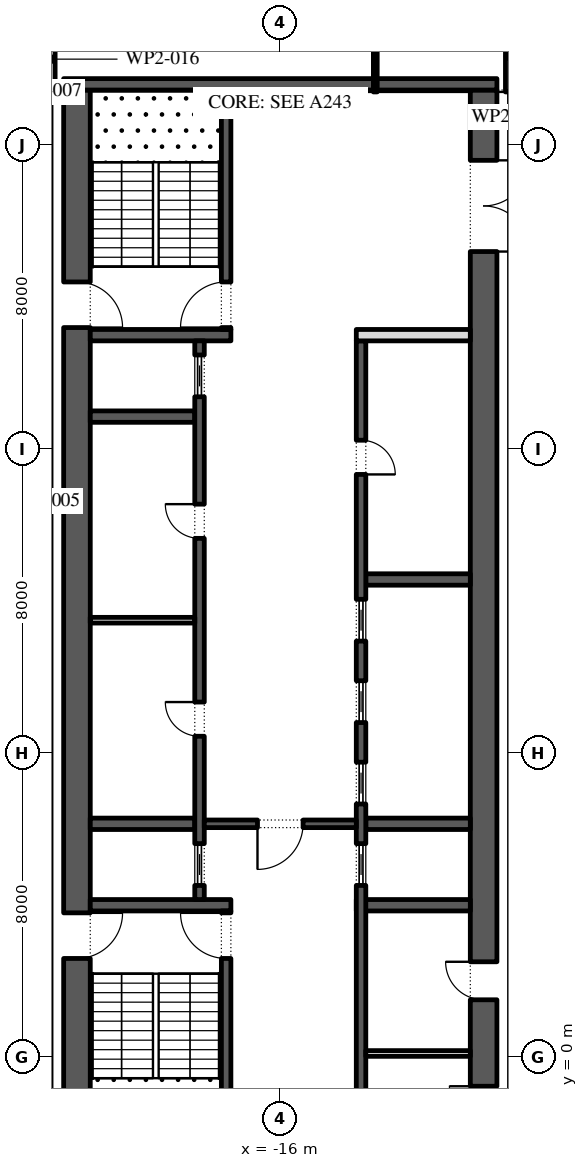
"""IFC4 building model, lengths in metres.
Left out: names, types, materials, properties, quantities, classifications, styles, units other than length and angle.
Written with IfcOpenShell. Run it as: python <this file> out.ifc"""

import sys

from ifc_helpers import new_model, si_unit, direction, frame, frame_2d, origin, place, context, subcontext, project, spatial, rectangle, extrude, element, fill, save


model = new_model("IFC4")
c1 = context("Model", 3, precision=1e-05, world=origin(), true_north=direction((0.0, 1.0)))
c2 = subcontext(c1, "Body", "Model", "MODEL_VIEW")
j1 = project(units=[si_unit("LENGTHUNIT", "METRE"), si_unit("PLANEANGLEUNIT", "RADIAN")], contexts=[c1])
p1 = place(None, origin())
s1 = spatial("IfcSite", under=j1, at=p1, CompositionType="ELEMENT")
p2 = place(p1, origin())
s2 = spatial("IfcBuilding", under=s1, at=p2, CompositionType="ELEMENT")
p3 = place(p2, frame((0.0, 0.0, 184.2)))
s3 = spatial("IfcBuildingStorey", under=s2, at=p3, CompositionType="ELEMENT", Elevation=184.2)
p4 = place(p3, frame((-33.157, 30.092, 0.0), z_axis=(0.0, 0.0, 1.0), x_axis=(0.224950279389, -0.974370243697, 0.0)))
e1 = element("IfcWall", 1, at=p4, inside=s3, PredefinedType="STANDARD", context=c2, shape_type="SweptSolid", body=[
    extrude(rectangle(XDim=49.5, YDim=0.3, at=frame_2d((24.75, 0.0))), origin(), (0.0, 0.0, 1.0), 4.0),
])
p5 = place(p4, frame((2.207, 0.0, 0.0)))
e2 = element("IfcOpeningElement", 2, at=p5, cuts=e1, PredefinedType="OPENING", context=c2, shape_type="SweptSolid", body=[
    extrude(rectangle(XDim=2.4, YDim=3.5, at=frame_2d((1.2, 1.75))), frame((0.0, 0.16, 0.0), z_axis=(0.0, -1.0, 0.0), x_axis=(1.0, 0.0, 0.0)), (0.0, 0.0, 1.0), 0.32),
])
p6 = place(p4, frame((8.121, 0.0, 0.45)))
e3 = element("IfcOpeningElement", 3, at=p6, cuts=e1, PredefinedType="OPENING", context=c2, shape_type="SweptSolid", body=[
    extrude(rectangle(XDim=4.5, YDim=2.825, at=frame_2d((2.25, 1.413))), frame((0.0, 0.16, 0.0), z_axis=(0.0, -1.0, 0.0), x_axis=(1.0, 0.0, 0.0)), (0.0, 0.0, 1.0), 0.32),
])
p7 = place(p4, frame((15.236, 0.0, 0.45)))
e4 = element("IfcOpeningElement", 4, at=p7, cuts=e1, PredefinedType="OPENING", context=c2, shape_type="SweptSolid", body=[
    extrude(rectangle(XDim=4.5, YDim=2.95, at=frame_2d((2.25, 1.475))), frame((0.0, 0.16, 0.0), z_axis=(0.0, -1.0, 0.0), x_axis=(1.0, 0.0, 0.0)), (0.0, 0.0, 1.0), 0.32),
])
p8 = place(p4, frame((22.35, 0.0, 0.45)))
e5 = element("IfcOpeningElement", 5, at=p8, cuts=e1, PredefinedType="OPENING", context=c2, shape_type="SweptSolid", body=[
    extrude(rectangle(XDim=4.5, YDim=3.0, at=frame_2d((2.25, 1.5))), frame((0.0, 0.16, 0.0), z_axis=(0.0, -1.0, 0.0), x_axis=(1.0, 0.0, 0.0)), (0.0, 0.0, 1.0), 0.32),
])
p9 = place(p4, frame((30.514, 0.0, 0.0)))
e6 = element("IfcOpeningElement", 6, at=p9, cuts=e1, PredefinedType="OPENING", context=c2, shape_type="SweptSolid", body=[
    extrude(rectangle(XDim=2.4, YDim=3.5, at=frame_2d((1.2, 1.75))), frame((0.0, 0.16, 0.0), z_axis=(0.0, -1.0, 0.0), x_axis=(1.0, 0.0, 0.0)), (0.0, 0.0, 1.0), 0.32),
])
p10 = place(p4, frame((36.579, 0.0, 0.45)))
e7 = element("IfcOpeningElement", 7, at=p10, cuts=e1, PredefinedType="OPENING", context=c2, shape_type="SweptSolid", body=[
    extrude(rectangle(XDim=4.5, YDim=3.05, at=frame_2d((2.25, 1.525))), frame((0.0, 0.16, 0.0), z_axis=(0.0, -1.0, 0.0), x_axis=(1.0, 0.0, 0.0)), (0.0, 0.0, 1.0), 0.32),
])
p11 = place(p4, frame((43.693, 0.0, 0.45)))
e8 = element("IfcOpeningElement", 8, at=p11, cuts=e1, PredefinedType="OPENING", context=c2, shape_type="SweptSolid", body=[
    extrude(rectangle(XDim=4.5, YDim=3.05, at=frame_2d((2.25, 1.525))), frame((0.0, 0.16, 0.0), z_axis=(0.0, -1.0, 0.0), x_axis=(1.0, 0.0, 0.0)), (0.0, 0.0, 1.0), 0.32),
])
p12 = place(p3, frame((-21.35, -2.45, 0.0), z_axis=(0.0, 0.0, 1.0), x_axis=(0.0, 1.0, 0.0)))
e9 = element("IfcWall", 9, at=p12, inside=s3, PredefinedType="SHEAR", context=c2, shape_type="SweptSolid", body=[
    extrude(rectangle(XDim=27.9, YDim=0.7, at=frame_2d((13.95, 0.0))), origin(), (0.0, 0.0, 1.0), 4.0),
])
p13 = place(p12, frame((5.05, 0.0, 0.0)))
e10 = element("IfcOpeningElement", 10, at=p13, cuts=e9, PredefinedType="OPENING", context=c2, shape_type="SweptSolid", body=[
    extrude(rectangle(XDim=1.2, YDim=2.1, at=frame_2d((0.6, 1.05))), frame((0.0, 0.36, 0.0), z_axis=(0.0, -1.0, 0.0), x_axis=(1.0, 0.0, 0.0)), (0.0, 0.0, 1.0), 0.72),
])
p14 = place(p12, frame((21.65, 0.0, 0.0)))
e11 = element("IfcOpeningElement", 11, at=p14, cuts=e9, PredefinedType="OPENING", context=c2, shape_type="SweptSolid", body=[
    extrude(rectangle(XDim=1.2, YDim=2.1, at=frame_2d((0.6, 1.05))), frame((0.0, 0.36, 0.0), z_axis=(0.0, -1.0, 0.0), x_axis=(1.0, 0.0, 0.0)), (0.0, 0.0, 1.0), 0.72),
])
p15 = place(p3, frame((-10.65, -2.45, 0.0), z_axis=(0.0, 0.0, 1.0), x_axis=(0.0, 1.0, 0.0)))
e12 = element("IfcWall", 12, at=p15, inside=s3, PredefinedType="SHEAR", context=c2, shape_type="SweptSolid", body=[
    extrude(rectangle(XDim=27.9, YDim=0.7, at=frame_2d((13.95, 0.0))), origin(), (0.0, 0.0, 1.0), 4.0),
])
p16 = place(p15, frame((23.65, 0.0, 0.0)))
e13 = element("IfcOpeningElement", 13, at=p16, cuts=e12, PredefinedType="OPENING", context=c2, shape_type="SweptSolid", body=[
    extrude(rectangle(XDim=2.4, YDim=2.1, at=frame_2d((1.2, 1.05))), frame((0.0, 0.36, 0.0), z_axis=(0.0, -1.0, 0.0), x_axis=(1.0, 0.0, 0.0)), (0.0, 0.0, 1.0), 0.72),
])
p17 = place(p15, frame((0.788, 0.0, 0.0)))
e14 = element("IfcOpeningElement", 14, at=p17, cuts=e12, PredefinedType="OPENING", context=c2, shape_type="SweptSolid", body=[
    extrude(rectangle(XDim=0.9, YDim=2.1, at=frame_2d((0.45, 1.05))), frame((0.0, 0.36, 0.0), z_axis=(0.0, -1.0, 0.0), x_axis=(1.0, 0.0, 0.0)), (0.0, 0.0, 1.0), 0.72),
])
p18 = place(p15, frame((3.962, 0.0, 0.0)))
e15 = element("IfcOpeningElement", 15, at=p18, cuts=e12, PredefinedType="OPENING", context=c2, shape_type="SweptSolid", body=[
    extrude(rectangle(XDim=1.0, YDim=2.1, at=frame_2d((0.5, 1.05))), frame((0.0, 0.36, 0.0), z_axis=(0.0, -1.0, 0.0), x_axis=(1.0, 0.0, 0.0)), (0.0, 0.0, 1.0), 0.72),
])
p19 = place(p3, frame((-21.7, 25.6, 0.0), z_axis=(0.0, 0.0, 1.0), x_axis=(1.0, 0.0, 0.0)))
e16 = element("IfcWall", 16, at=p19, inside=s3, PredefinedType="SHEAR", context=c2, shape_type="SweptSolid", body=[
    extrude(rectangle(XDim=11.4, YDim=0.3, at=frame_2d((5.7, 0.0))), origin(), (0.0, 0.0, 1.0), 4.0),
])
p20 = place(p3, frame((-21.0, 4.0, 0.0), z_axis=(0.0, 0.0, 1.0), x_axis=(1.0, 0.0, 0.0)))
e17 = element("IfcWall", 17, at=p20, inside=s3, PredefinedType="SHEAR", context=c2, shape_type="SweptSolid", body=[
    extrude(rectangle(XDim=3.7, YDim=0.3, at=frame_2d((1.85, 0.0))), origin(), (0.0, 0.0, 1.0), 4.0),
])
p21 = place(p3, frame((-17.425, -2.45, 0.0), z_axis=(0.0, 0.0, 1.0), x_axis=(0.0, 1.0, 0.0)))
e18 = element("IfcWall", 18, at=p21, inside=s3, PredefinedType="SHEAR", context=c2, shape_type="SweptSolid", body=[
    extrude(rectangle(XDim=6.3, YDim=0.25, at=frame_2d((3.15, 0.0))), origin(), (0.0, 0.0, 1.0), 4.0),
])
p22 = place(p21, frame((5.05, 0.0, 0.0)))
e19 = element("IfcOpeningElement", 19, at=p22, cuts=e18, PredefinedType="OPENING", context=c2, shape_type="SweptSolid", body=[
    extrude(rectangle(XDim=1.2, YDim=2.1, at=frame_2d((0.6, 1.05))), frame((0.0, 0.135, 0.0), z_axis=(0.0, -1.0, 0.0), x_axis=(1.0, 0.0, 0.0)), (0.0, 0.0, 1.0), 0.27),
])
p23 = place(p3, frame((-21.0, 19.0, 0.0), z_axis=(0.0, 0.0, 1.0), x_axis=(1.0, 0.0, 0.0)))
e20 = element("IfcWall", 20, at=p23, inside=s3, PredefinedType="SHEAR", context=c2, shape_type="SweptSolid", body=[
    extrude(rectangle(XDim=3.7, YDim=0.3, at=frame_2d((1.85, 0.0))), origin(), (0.0, 0.0, 1.0), 4.0),
])
p24 = place(p3, frame((-17.425, 19.15, 0.0), z_axis=(0.0, 0.0, 1.0), x_axis=(0.0, 1.0, 0.0)))
e21 = element("IfcWall", 21, at=p24, inside=s3, PredefinedType="SHEAR", context=c2, shape_type="SweptSolid", body=[
    extrude(rectangle(XDim=6.3, YDim=0.25, at=frame_2d((3.15, 0.0))), origin(), (0.0, 0.0, 1.0), 4.0),
])
p25 = place(p24, frame((0.05, 0.0, 0.0)))
e22 = element("IfcOpeningElement", 22, at=p25, cuts=e21, PredefinedType="OPENING", context=c2, shape_type="SweptSolid", body=[
    extrude(rectangle(XDim=1.2, YDim=2.1, at=frame_2d((0.6, 1.05))), frame((0.0, 0.135, 0.0), z_axis=(0.0, -1.0, 0.0), x_axis=(1.0, 0.0, 0.0)), (0.0, 0.0, 1.0), 0.27),
])
for number, where, z_axis, x_axis in (
    (23, (-21.0, 6.143, 0.0), (0.0, 0.0, 1.0), (1.0, 0.0, 0.0)),
    (24, (-21.0, 16.857, 0.0), (0.0, 0.0, 1.0), (1.0, 0.0, 0.0)),
):
    element("IfcWall", number, at=place(p3, frame(where, z_axis=z_axis, x_axis=x_axis)), inside=s3, PredefinedType="SHEAR", context=c2, shape_type="SweptSolid", body=[
        extrude(rectangle(XDim=2.75, YDim=0.3, at=frame_2d((1.375, 0.0))), origin(), (0.0, 0.0, 1.0), 4.0),
    ])
p26 = place(p3, frame((-18.125, 4.15, 0.0), z_axis=(0.0, 0.0, 1.0), x_axis=(0.0, 1.0, 0.0)))
e25 = element("IfcWall", 25, at=p26, inside=s3, PredefinedType="SHEAR", context=c2, shape_type="SweptSolid", body=[
    extrude(rectangle(XDim=14.7, YDim=0.25, at=frame_2d((7.35, 0.0))), origin(), (0.0, 0.0, 1.0), 4.0),
])
p27 = place(p26, frame((4.296, 0.0, 0.0)))
e26 = element("IfcOpeningElement", 26, at=p27, cuts=e25, PredefinedType="OPENING", context=c2, shape_type="SweptSolid", body=[
    extrude(rectangle(XDim=0.9, YDim=2.1, at=frame_2d((0.45, 1.05))), frame((0.0, 0.135, 0.0), z_axis=(0.0, -1.0, 0.0), x_axis=(1.0, 0.0, 0.0)), (0.0, 0.0, 1.0), 0.27),
])
p28 = place(p26, frame((9.504, 0.0, 0.0)))
e27 = element("IfcOpeningElement", 27, at=p28, cuts=e25, PredefinedType="OPENING", context=c2, shape_type="SweptSolid", body=[
    extrude(rectangle(XDim=0.9, YDim=2.1, at=frame_2d((0.45, 1.05))), frame((0.0, 0.135, 0.0), z_axis=(0.0, -1.0, 0.0), x_axis=(1.0, 0.0, 0.0)), (0.0, 0.0, 1.0), 0.27),
])
p29 = place(p26, frame((0.371, 0.0, 0.0)))
e28 = element("IfcOpeningElement", 28, at=p29, cuts=e25, PredefinedType="OPENING", context=c2, shape_type="SweptSolid", body=[
    extrude(rectangle(XDim=1.1, YDim=2.1, at=frame_2d((0.55, 1.05))), frame((0.0, 0.135, 0.0), z_axis=(0.0, -1.0, 0.0), x_axis=(1.0, 0.0, 0.0)), (0.0, 0.0, 1.0), 0.27),
])
p30 = place(p26, frame((13.229, 0.0, 0.0)))
e29 = element("IfcOpeningElement", 29, at=p30, cuts=e25, PredefinedType="OPENING", context=c2, shape_type="SweptSolid", body=[
    extrude(rectangle(XDim=1.1, YDim=2.1, at=frame_2d((0.55, 1.05))), frame((0.0, 0.135, 0.0), z_axis=(0.0, -1.0, 0.0), x_axis=(1.0, 0.0, 0.0)), (0.0, 0.0, 1.0), 0.27),
])
p31 = place(p3, frame((-21.0, 11.5, 0.0), z_axis=(0.0, 0.0, 1.0), x_axis=(1.0, 0.0, 0.0)))
e30 = element("IfcWall", 30, at=p31, inside=s3, PredefinedType="PARTITIONING", context=c2, shape_type="SweptSolid", body=[
    extrude(rectangle(XDim=2.75, YDim=0.15, at=frame_2d((1.375, 0.0))), origin(), (0.0, 0.0, 1.0), 4.0),
])
p32 = place(p3, frame((-14.0, 4.0, 0.0), z_axis=(0.0, 0.0, 1.0), x_axis=(1.0, 0.0, 0.0)))
e31 = element("IfcWall", 31, at=p32, inside=s3, PredefinedType="SHEAR", context=c2, shape_type="SweptSolid", body=[
    extrude(rectangle(XDim=3.0, YDim=0.3, at=frame_2d((1.5, 0.0))), origin(), (0.0, 0.0, 1.0), 4.0),
])
for number, where, z_axis, x_axis in (
    (32, (-13.75, 6.143, 0.0), (0.0, 0.0, 1.0), (1.0, 0.0, 0.0)),
    (33, (-13.75, 12.571, 0.0), (0.0, 0.0, 1.0), (1.0, 0.0, 0.0)),
):
    element("IfcWall", number, at=place(p3, frame(where, z_axis=z_axis, x_axis=x_axis)), inside=s3, PredefinedType="SHEAR", context=c2, shape_type="SweptSolid", body=[
        extrude(rectangle(XDim=2.75, YDim=0.3, at=frame_2d((1.375, 0.0))), origin(), (0.0, 0.0, 1.0), 4.0),
    ])
p33 = place(p3, frame((-13.875, -2.45, 0.0), z_axis=(0.0, 0.0, 1.0), x_axis=(0.0, 1.0, 0.0)))
e34 = element("IfcWall", 34, at=p33, inside=s3, PredefinedType="SHEAR", context=c2, shape_type="SweptSolid", body=[
    extrude(rectangle(XDim=21.3, YDim=0.25, at=frame_2d((10.65, 0.0))), origin(), (0.0, 0.0, 1.0), 4.0),
])
p34 = place(p33, frame((17.786, 0.0, 0.0)))
e35 = element("IfcOpeningElement", 35, at=p34, cuts=e34, PredefinedType="OPENING", context=c2, shape_type="SweptSolid", body=[
    extrude(rectangle(XDim=0.9, YDim=2.1, at=frame_2d((0.45, 1.05))), frame((0.0, 0.135, 0.0), z_axis=(0.0, -1.0, 0.0), x_axis=(1.0, 0.0, 0.0)), (0.0, 0.0, 1.0), 0.27),
])
p35 = place(p33, frame((6.971, 0.0, 0.0)))
e36 = element("IfcOpeningElement", 36, at=p35, cuts=e34, PredefinedType="OPENING", context=c2, shape_type="SweptSolid", body=[
    extrude(rectangle(XDim=1.1, YDim=2.1, at=frame_2d((0.55, 1.05))), frame((0.0, 0.135, 0.0), z_axis=(0.0, -1.0, 0.0), x_axis=(1.0, 0.0, 0.0)), (0.0, 0.0, 1.0), 0.27),
])
p36 = place(p33, frame((9.114, 0.0, 0.0)))
e37 = element("IfcOpeningElement", 37, at=p36, cuts=e34, PredefinedType="OPENING", context=c2, shape_type="SweptSolid", body=[
    extrude(rectangle(XDim=1.1, YDim=2.1, at=frame_2d((0.55, 1.05))), frame((0.0, 0.135, 0.0), z_axis=(0.0, -1.0, 0.0), x_axis=(1.0, 0.0, 0.0)), (0.0, 0.0, 1.0), 0.27),
])
p37 = place(p33, frame((11.257, 0.0, 0.0)))
e38 = element("IfcOpeningElement", 38, at=p37, cuts=e34, PredefinedType="OPENING", context=c2, shape_type="SweptSolid", body=[
    extrude(rectangle(XDim=1.1, YDim=2.1, at=frame_2d((0.55, 1.05))), frame((0.0, 0.135, 0.0), z_axis=(0.0, -1.0, 0.0), x_axis=(1.0, 0.0, 0.0)), (0.0, 0.0, 1.0), 0.27),
])
p38 = place(p33, frame((13.4, 0.0, 0.0)))
e39 = element("IfcOpeningElement", 39, at=p38, cuts=e34, PredefinedType="OPENING", context=c2, shape_type="SweptSolid", body=[
    extrude(rectangle(XDim=1.1, YDim=2.1, at=frame_2d((0.55, 1.05))), frame((0.0, 0.135, 0.0), z_axis=(0.0, -1.0, 0.0), x_axis=(1.0, 0.0, 0.0)), (0.0, 0.0, 1.0), 0.27),
])
p39 = place(p3, frame((-14.0, 19.0, 0.0), z_axis=(0.0, 0.0, 1.0), x_axis=(1.0, 0.0, 0.0)))
e40 = element("IfcWall", 40, at=p39, inside=s3, PredefinedType="PARTITIONING", context=c2, shape_type="SweptSolid", body=[
    extrude(rectangle(XDim=3.0, YDim=0.3, at=frame_2d((1.5, 0.0))), origin(), (0.0, 0.0, 1.0), 4.0),
])
p40 = place(p3, frame((-18.0, 6.143, 0.0), z_axis=(0.0, 0.0, 1.0), x_axis=(1.0, 0.0, 0.0)))
e41 = element("IfcWall", 41, at=p40, inside=s3, PredefinedType="SHEAR", context=c2, shape_type="SweptSolid", body=[
    extrude(rectangle(XDim=4.0, YDim=0.2, at=frame_2d((2.0, 0.0))), origin(), (0.0, 0.0, 1.0), 4.0),
])
p41 = place(p40, frame((1.4, 0.0, 0.0)))
e42 = element("IfcOpeningElement", 42, at=p41, cuts=e41, PredefinedType="OPENING", context=c2, shape_type="SweptSolid", body=[
    extrude(rectangle(XDim=1.2, YDim=2.1, at=frame_2d((0.6, 1.05))), frame((0.0, 0.11, 0.0), z_axis=(0.0, -1.0, 0.0), x_axis=(1.0, 0.0, 0.0)), (0.0, 0.0, 1.0), 0.22),
])
p42 = place(p3, frame((-13.75, 0.1, 0.0), z_axis=(0.0, 0.0, 1.0), x_axis=(1.0, 0.0, 0.0)))
e43 = element("IfcWall", 43, at=p42, inside=s3, PredefinedType="PARTITIONING", context=c2, shape_type="SweptSolid", body=[
    extrude(rectangle(XDim=2.75, YDim=0.15, at=frame_2d((1.375, 0.0))), origin(), (0.0, 0.0, 1.0), 4.0),
])
p43 = place(p3, frame((-22.0, 27.125, 0.0), z_axis=(0.0, 0.0, 1.0), x_axis=(0.0, -1.0, 0.0)))
e44 = element("IfcWall", 44, at=p43, inside=s3, PredefinedType="PARTITIONING", context=c2, shape_type="SweptSolid", body=[
    extrude(rectangle(XDim=1.725, YDim=0.15, at=frame_2d((0.863, 0.0))), origin(), (0.0, 0.0, 1.0), 4.0),
])
p44 = place(p3, frame((-13.5, 30.37, 0.0), z_axis=(0.0, 0.0, 1.0), x_axis=(0.0, -1.0, 0.0)))
e45 = element("IfcWall", 45, at=p44, inside=s3, PredefinedType="PARTITIONING", context=c2, shape_type="SweptSolid", body=[
    extrude(rectangle(XDim=4.97, YDim=0.1, at=frame_2d((2.485, 0.0))), origin(), (0.0, 0.0, 1.0), 4.0),
])
p45 = place(p3, frame((-10.0, 25.4, 0.0), z_axis=(0.0, 0.0, 1.0), x_axis=(0.0, 1.0, 0.0)))
e46 = element("IfcWall", 46, at=p45, inside=s3, PredefinedType="PARTITIONING", context=c2, shape_type="SweptSolid", body=[
    extrude(rectangle(XDim=1.875, YDim=0.15, at=frame_2d((0.938, 0.0))), origin(), (0.0, 0.0, 1.0), 4.0),
])
p46 = place(p27, origin())
e47 = element("IfcDoor", 47, at=p46, inside=s3, OperationType="SINGLE_SWING_LEFT", PredefinedType="DOOR", context=c2, shape_type="SweptSolid", body=[
    extrude(rectangle(XDim=0.9, YDim=2.1, at=frame_2d((0.45, 1.05))), frame((0.0, 0.125, 0.0), z_axis=(0.0, -1.0, 0.0), x_axis=(1.0, 0.0, 0.0)), (0.0, 0.0, 1.0), 0.05),
])
fill(e26, e47)
p47 = place(p28, origin())
e48 = element("IfcDoor", 48, at=p47, inside=s3, OperationType="SINGLE_SWING_LEFT", PredefinedType="DOOR", context=c2, shape_type="SweptSolid", body=[
    extrude(rectangle(XDim=0.9, YDim=2.1, at=frame_2d((0.45, 1.05))), frame((0.0, 0.125, 0.0), z_axis=(0.0, -1.0, 0.0), x_axis=(1.0, 0.0, 0.0)), (0.0, 0.0, 1.0), 0.05),
])
fill(e27, e48)
p48 = place(p29, origin())
e49 = element("IfcDoor", 49, at=p48, inside=s3, OperationType="SLIDING_TO_LEFT", PredefinedType="DOOR", context=c2, shape_type="SweptSolid", body=[
    extrude(rectangle(XDim=1.1, YDim=2.1, at=frame_2d((0.55, 1.05))), frame((0.0, 0.025, 0.0), z_axis=(0.0, -1.0, 0.0), x_axis=(1.0, 0.0, 0.0)), (0.0, 0.0, 1.0), 0.05),
])
fill(e28, e49)
p49 = place(p30, origin())
e50 = element("IfcDoor", 50, at=p49, inside=s3, OperationType="SLIDING_TO_LEFT", PredefinedType="DOOR", context=c2, shape_type="SweptSolid", body=[
    extrude(rectangle(XDim=1.1, YDim=2.1, at=frame_2d((0.55, 1.05))), frame((0.0, 0.025, 0.0), z_axis=(0.0, -1.0, 0.0), x_axis=(1.0, 0.0, 0.0)), (0.0, 0.0, 1.0), 0.05),
])
fill(e29, e50)
p50 = place(p34, frame((0.9, -0.2, 0.0), z_axis=(0.0, 0.0, 1.0), x_axis=(-1.0, 0.0, 0.0)))
e51 = element("IfcDoor", 51, at=p50, inside=s3, OperationType="SINGLE_SWING_LEFT", PredefinedType="DOOR", context=c2, shape_type="SweptSolid", body=[
    extrude(rectangle(XDim=0.9, YDim=2.1, at=frame_2d((0.45, 1.05))), frame((0.0, -0.075, 0.0), z_axis=(0.0, -1.0, 0.0), x_axis=(1.0, 0.0, 0.0)), (0.0, 0.0, 1.0), 0.05),
])
fill(e35, e51)
p51 = place(p35, origin())
e52 = element("IfcDoor", 52, at=p51, inside=s3, OperationType="SLIDING_TO_LEFT", PredefinedType="DOOR", context=c2, shape_type="SweptSolid", body=[
    extrude(rectangle(XDim=1.1, YDim=2.1, at=frame_2d((0.55, 1.05))), frame((0.0, 0.025, 0.0), z_axis=(0.0, -1.0, 0.0), x_axis=(1.0, 0.0, 0.0)), (0.0, 0.0, 1.0), 0.05),
])
fill(e36, e52)
p52 = place(p36, origin())
e53 = element("IfcDoor", 53, at=p52, inside=s3, OperationType="SLIDING_TO_LEFT", PredefinedType="DOOR", context=c2, shape_type="SweptSolid", body=[
    extrude(rectangle(XDim=1.1, YDim=2.1, at=frame_2d((0.55, 1.05))), frame((0.0, 0.025, 0.0), z_axis=(0.0, -1.0, 0.0), x_axis=(1.0, 0.0, 0.0)), (0.0, 0.0, 1.0), 0.05),
])
fill(e37, e53)
p53 = place(p37, origin())
e54 = element("IfcDoor", 54, at=p53, inside=s3, OperationType="SLIDING_TO_LEFT", PredefinedType="DOOR", context=c2, shape_type="SweptSolid", body=[
    extrude(rectangle(XDim=1.1, YDim=2.1, at=frame_2d((0.55, 1.05))), frame((0.0, 0.025, 0.0), z_axis=(0.0, -1.0, 0.0), x_axis=(1.0, 0.0, 0.0)), (0.0, 0.0, 1.0), 0.05),
])
fill(e38, e54)
p54 = place(p38, origin())
e55 = element("IfcDoor", 55, at=p54, inside=s3, OperationType="SLIDING_TO_LEFT", PredefinedType="DOOR", context=c2, shape_type="SweptSolid", body=[
    extrude(rectangle(XDim=1.1, YDim=2.1, at=frame_2d((0.55, 1.05))), frame((0.0, 0.025, 0.0), z_axis=(0.0, -1.0, 0.0), x_axis=(1.0, 0.0, 0.0)), (0.0, 0.0, 1.0), 0.05),
])
fill(e39, e55)
p55 = place(p41, frame((1.2, 0.0, 0.0), z_axis=(0.0, 0.0, 1.0), x_axis=(-1.0, 0.0, 0.0)))
e56 = element("IfcDoor", 56, at=p55, inside=s3, OperationType="SINGLE_SWING_LEFT", PredefinedType="DOOR", context=c2, shape_type="SweptSolid", body=[
    extrude(rectangle(XDim=1.2, YDim=2.1, at=frame_2d((0.6, 1.05))), frame((0.0, 0.025, 0.0), z_axis=(0.0, -1.0, 0.0), x_axis=(1.0, 0.0, 0.0)), (0.0, 0.0, 1.0), 0.05),
])
fill(e42, e56)
p56 = place(p16, frame((2.4, 0.0, 0.0), z_axis=(0.0, 0.0, 1.0), x_axis=(-1.0, 0.0, 0.0)))
e57 = element("IfcDoor", 57, at=p56, inside=s3, OperationType="DOUBLE_DOOR_SINGLE_SWING", PredefinedType="DOOR", context=c2, shape_type="SweptSolid", body=[
    extrude(rectangle(XDim=2.4, YDim=2.1, at=frame_2d((1.2, 1.05))), frame((0.0, 0.025, 0.0), z_axis=(0.0, -1.0, 0.0), x_axis=(1.0, 0.0, 0.0)), (0.0, 0.0, 1.0), 0.05),
])
fill(e13, e57)
p57 = place(p22, origin())
e58 = element("IfcDoor", 58, at=p57, inside=s3, OperationType="SINGLE_SWING_LEFT", PredefinedType="DOOR", context=c2, shape_type="SweptSolid", body=[
    extrude(rectangle(XDim=1.2, YDim=2.1, at=frame_2d((0.6, 1.05))), frame((0.0, 0.025, 0.0), z_axis=(0.0, -1.0, 0.0), x_axis=(1.0, 0.0, 0.0)), (0.0, 0.0, 1.0), 0.05),
])
fill(e19, e58)
p58 = place(p13, frame((1.2, 0.0, 0.0), z_axis=(0.0, 0.0, 1.0), x_axis=(-1.0, 0.0, 0.0)))
e59 = element("IfcDoor", 59, at=p58, inside=s3, OperationType="SINGLE_SWING_RIGHT", PredefinedType="DOOR", context=c2, shape_type="SweptSolid", body=[
    extrude(rectangle(XDim=1.2, YDim=2.1, at=frame_2d((0.6, 1.05))), frame((0.0, 0.025, 0.0), z_axis=(0.0, -1.0, 0.0), x_axis=(1.0, 0.0, 0.0)), (0.0, 0.0, 1.0), 0.05),
])
fill(e10, e59)
p59 = place(p25, origin())
e60 = element("IfcDoor", 60, at=p59, inside=s3, OperationType="SINGLE_SWING_RIGHT", PredefinedType="DOOR", context=c2, shape_type="SweptSolid", body=[
    extrude(rectangle(XDim=1.2, YDim=2.1, at=frame_2d((0.6, 1.05))), frame((0.0, 0.025, 0.0), z_axis=(0.0, -1.0, 0.0), x_axis=(1.0, 0.0, 0.0)), (0.0, 0.0, 1.0), 0.05),
])
fill(e22, e60)
p60 = place(p14, frame((1.2, 0.0, 0.0), z_axis=(0.0, 0.0, 1.0), x_axis=(-1.0, 0.0, 0.0)))
e61 = element("IfcDoor", 61, at=p60, inside=s3, OperationType="SINGLE_SWING_LEFT", PredefinedType="DOOR", context=c2, shape_type="SweptSolid", body=[
    extrude(rectangle(XDim=1.2, YDim=2.1, at=frame_2d((0.6, 1.05))), frame((0.0, 0.025, 0.0), z_axis=(0.0, -1.0, 0.0), x_axis=(1.0, 0.0, 0.0)), (0.0, 0.0, 1.0), 0.05),
])
fill(e11, e61)
p61 = place(p17, origin())
e62 = element("IfcDoor", 62, at=p61, inside=s3, OperationType="SINGLE_SWING_LEFT", PredefinedType="DOOR", context=c2, shape_type="SweptSolid", body=[
    extrude(rectangle(XDim=0.9, YDim=2.1, at=frame_2d((0.45, 1.05))), frame((0.0, 0.35, 0.0), z_axis=(0.0, -1.0, 0.0), x_axis=(1.0, 0.0, 0.0)), (0.0, 0.0, 1.0), 0.05),
])
fill(e14, e62)
p62 = place(p18, origin())
e63 = element("IfcDoor", 63, at=p62, inside=s3, OperationType="SINGLE_SWING_LEFT", PredefinedType="DOOR", context=c2, shape_type="SweptSolid", body=[
    extrude(rectangle(XDim=1.0, YDim=2.1, at=frame_2d((0.5, 1.05))), frame((0.0, 0.35, 0.0), z_axis=(0.0, -1.0, 0.0), x_axis=(1.0, 0.0, 0.0)), (0.0, 0.0, 1.0), 0.05),
])
fill(e15, e63)
save(model, sys.argv[1])
